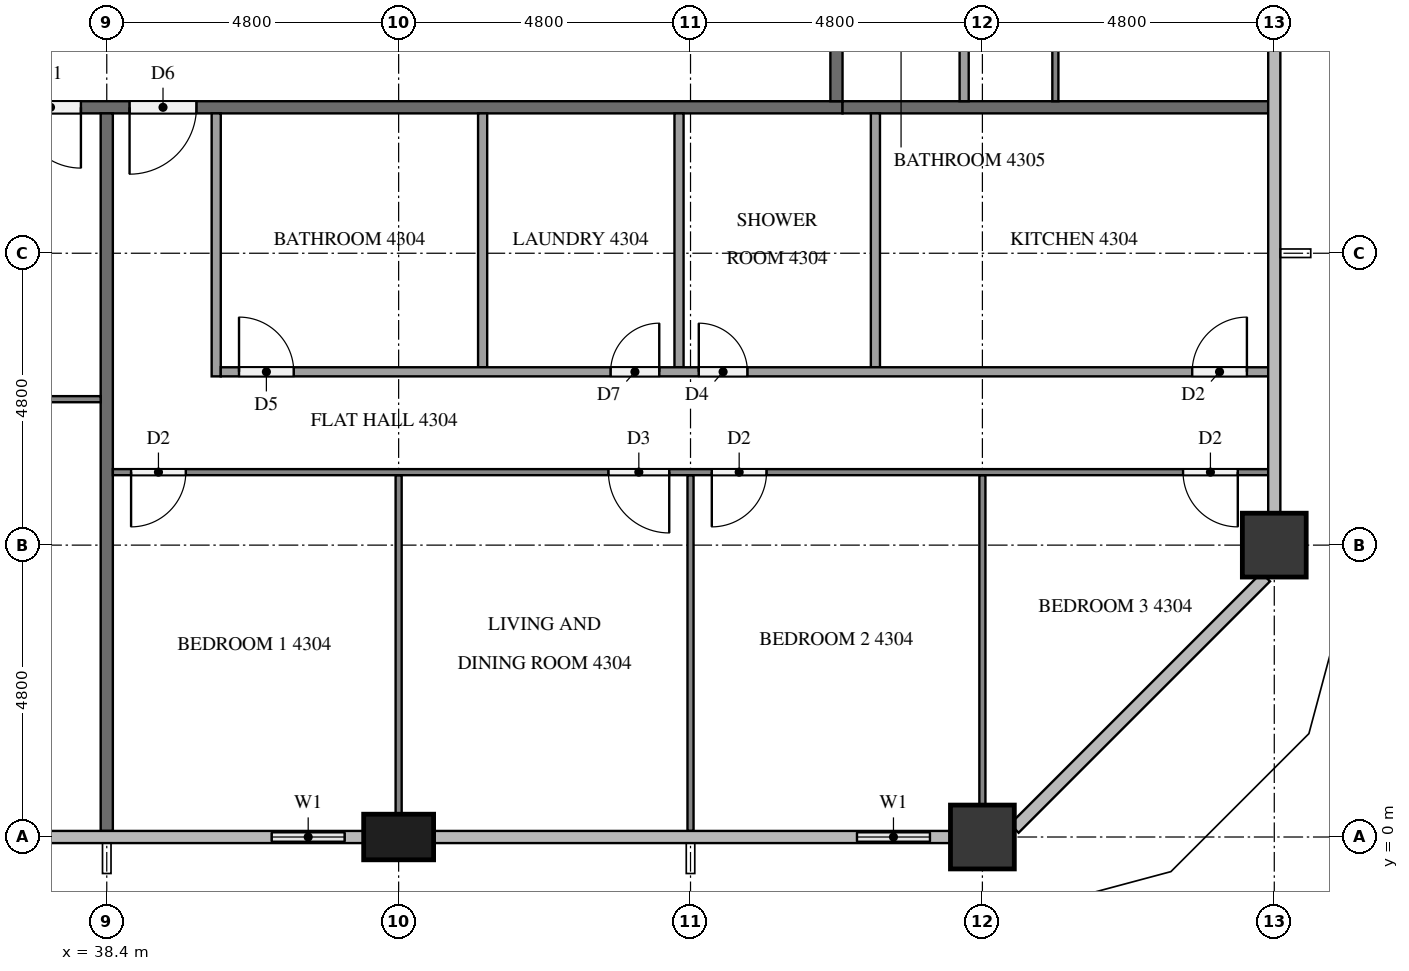
"""IFC4 building model, lengths in metres.
Left out: names, types, materials, properties, quantities, classifications, styles, units other than length and angle.
Written with IfcOpenShell. Run it as: python <this file> out.ifc"""

import sys

from ifc_helpers import new_model, si_unit, direction, frame, frame_2d, origin, origin_2d, place, context, subcontext, project, spatial, rectangle, extrude, element, fill, save


model = new_model("IFC4")
c1 = context("Model", 3, precision=1e-05, world=origin(), true_north=direction((0.0, 1.0)))
c2 = subcontext(c1, "Body", "Model", "MODEL_VIEW")
j1 = project(units=[si_unit("LENGTHUNIT", "METRE"), si_unit("PLANEANGLEUNIT", "RADIAN")], contexts=[c1])
p1 = place(None, origin())
s1 = spatial("IfcSite", under=j1, at=p1, CompositionType="ELEMENT")
p2 = place(p1, origin())
s2 = spatial("IfcBuilding", under=s1, at=p2, CompositionType="ELEMENT")
p3 = place(p2, frame((0.0, 0.0, 166.5)))
s3 = spatial("IfcBuildingStorey", under=s2, at=p3, CompositionType="ELEMENT", Elevation=166.5)
p4 = place(p3, frame((43.2, 0.0, 0.0), z_axis=(0.0, 0.0, 1.0), x_axis=(1.0, 0.0, 0.0)))
e1 = element("IfcColumn", 1, at=p4, inside=s3, PredefinedType="COLUMN", context=c2, shape_type="SweptSolid", body=[
    extrude(rectangle(XDim=1.15, YDim=0.75, at=origin_2d()), origin(), (0.0, 0.0, 1.0), 3.2),
])
for number, where, z_axis, x_axis in (
    (2, (52.8, 0.0, 0.0), (0.0, 0.0, 1.0), (1.0, 0.0, 0.0)),
    (3, (57.6, 4.8, 0.0), (0.0, 0.0, 1.0), (1.0, 0.0, 0.0)),
):
    element("IfcColumn", number, at=place(p3, frame(where, z_axis=z_axis, x_axis=x_axis)), inside=s3, PredefinedType="COLUMN", context=c2, shape_type="SweptSolid", body=[
        extrude(rectangle(XDim=1.05, YDim=1.05, at=origin_2d()), origin(), (0.0, 0.0, 1.0), 3.2),
    ])
p5 = place(p3, frame((40.8, 0.0, 0.0), z_axis=(0.0, 0.0, 1.0), x_axis=(1.0, 0.0, 0.0)))
e4 = element("IfcWall", 4, at=p5, inside=s3, PredefinedType="SOLIDWALL", context=c2, shape_type="SweptSolid", body=[
    extrude(rectangle(XDim=1.825, YDim=0.15, at=frame_2d((0.913, 0.0))), origin(), (0.0, 0.0, 1.0), 3.2),
])
p6 = place(p5, frame((0.312, 0.0, 0.9)))
e5 = element("IfcOpeningElement", 5, at=p6, cuts=e4, PredefinedType="OPENING", context=c2, shape_type="SweptSolid", body=[
    extrude(rectangle(XDim=1.2, YDim=1.4, at=frame_2d((0.6, 0.7))), frame((0.0, 0.085, 0.0), z_axis=(0.0, -1.0, 0.0), x_axis=(1.0, 0.0, 0.0)), (0.0, 0.0, 1.0), 0.17),
])
p7 = place(p3, frame((50.4, 0.0, 0.0), z_axis=(0.0, 0.0, 1.0), x_axis=(1.0, 0.0, 0.0)))
e6 = element("IfcWall", 6, at=p7, inside=s3, PredefinedType="SOLIDWALL", context=c2, shape_type="SweptSolid", body=[
    extrude(rectangle(XDim=1.875, YDim=0.15, at=frame_2d((0.938, 0.0))), origin(), (0.0, 0.0, 1.0), 3.2),
])
p8 = place(p7, frame((0.337, 0.0, 0.9)))
e7 = element("IfcOpeningElement", 7, at=p8, cuts=e6, PredefinedType="OPENING", context=c2, shape_type="SweptSolid", body=[
    extrude(rectangle(XDim=1.2, YDim=1.4, at=frame_2d((0.6, 0.7))), frame((0.0, 0.085, 0.0), z_axis=(0.0, -1.0, 0.0), x_axis=(1.0, 0.0, 0.0)), (0.0, 0.0, 1.0), 0.17),
])
p9 = place(p3, frame((50.5, 12.0, 0.0), z_axis=(0.0, 0.0, 1.0), x_axis=(-1.0, 0.0, 0.0)))
e8 = element("IfcWall", 8, at=p9, inside=s3, PredefinedType="PARTITIONING", context=c2, shape_type="SweptSolid", body=[
    extrude(rectangle(XDim=38.6, YDim=0.2, at=frame_2d((19.3, 0.0))), origin(), (0.0, 0.0, 1.0), 3.2),
])
p10 = place(p9, frame((34.125, 0.0, 0.0)))
e9 = element("IfcOpeningElement", 9, at=p10, cuts=e8, PredefinedType="OPENING", context=c2, shape_type="SweptSolid", body=[
    extrude(rectangle(XDim=1.0, YDim=2.1, at=frame_2d((0.5, 1.05))), frame((0.0, 0.11, 0.0), z_axis=(0.0, -1.0, 0.0), x_axis=(1.0, 0.0, 0.0)), (0.0, 0.0, 1.0), 0.22),
])
p11 = place(p9, frame((32.275, 0.0, 0.0)))
e10 = element("IfcOpeningElement", 10, at=p11, cuts=e8, PredefinedType="OPENING", context=c2, shape_type="SweptSolid", body=[
    extrude(rectangle(XDim=1.0, YDim=2.1, at=frame_2d((0.5, 1.05))), frame((0.0, 0.11, 0.0), z_axis=(0.0, -1.0, 0.0), x_axis=(1.0, 0.0, 0.0)), (0.0, 0.0, 1.0), 0.22),
])
p12 = place(p9, frame((12.525, 0.0, 0.0)))
e11 = element("IfcOpeningElement", 11, at=p12, cuts=e8, PredefinedType="OPENING", context=c2, shape_type="SweptSolid", body=[
    extrude(rectangle(XDim=1.0, YDim=2.1, at=frame_2d((0.5, 1.05))), frame((0.0, 0.11, 0.0), z_axis=(0.0, -1.0, 0.0), x_axis=(1.0, 0.0, 0.0)), (0.0, 0.0, 1.0), 0.22),
])
p13 = place(p9, frame((10.625, 0.0, 0.0)))
e12 = element("IfcOpeningElement", 12, at=p13, cuts=e8, PredefinedType="OPENING", context=c2, shape_type="SweptSolid", body=[
    extrude(rectangle(XDim=1.1, YDim=2.1, at=frame_2d((0.55, 1.05))), frame((0.0, 0.11, 0.0), z_axis=(0.0, -1.0, 0.0), x_axis=(1.0, 0.0, 0.0)), (0.0, 0.0, 1.0), 0.22),
])
p14 = place(p3, frame((50.4, 40.7, 0.0), z_axis=(0.0, 0.0, 1.0), x_axis=(0.0, -1.0, 0.0)))
e13 = element("IfcWall", 13, at=p14, inside=s3, PredefinedType="PARTITIONING", context=c2, shape_type="SweptSolid", body=[
    extrude(rectangle(XDim=28.6, YDim=0.2, at=frame_2d((14.3, 0.0))), origin(), (0.0, 0.0, 1.0), 3.2),
])
p15 = place(p14, frame((19.525, 0.0, 0.0)))
e14 = element("IfcOpeningElement", 14, at=p15, cuts=e13, PredefinedType="OPENING", context=c2, shape_type="SweptSolid", body=[
    extrude(rectangle(XDim=1.0, YDim=2.1, at=frame_2d((0.5, 1.05))), frame((0.0, 0.11, 0.0), z_axis=(0.0, -1.0, 0.0), x_axis=(1.0, 0.0, 0.0)), (0.0, 0.0, 1.0), 0.22),
])
p16 = place(p14, frame((17.675, 0.0, 0.0)))
e15 = element("IfcOpeningElement", 15, at=p16, cuts=e13, PredefinedType="OPENING", context=c2, shape_type="SweptSolid", body=[
    extrude(rectangle(XDim=1.0, YDim=2.1, at=frame_2d((0.5, 1.05))), frame((0.0, 0.11, 0.0), z_axis=(0.0, -1.0, 0.0), x_axis=(1.0, 0.0, 0.0)), (0.0, 0.0, 1.0), 0.22),
])
p17 = place(p14, frame((8.075, 0.0, 0.0)))
e16 = element("IfcOpeningElement", 16, at=p17, cuts=e13, PredefinedType="OPENING", context=c2, shape_type="SweptSolid", body=[
    extrude(rectangle(XDim=1.0, YDim=2.1, at=frame_2d((0.5, 1.05))), frame((0.0, 0.11, 0.0), z_axis=(0.0, -1.0, 0.0), x_axis=(1.0, 0.0, 0.0)), (0.0, 0.0, 1.0), 0.22),
])
p18 = place(p3, frame((38.4, 11.9, 0.0), z_axis=(0.0, 0.0, 1.0), x_axis=(0.0, -1.0, 0.0)))
e17 = element("IfcWall", 17, at=p18, inside=s3, PredefinedType="PARTITIONING", context=c2, shape_type="SweptSolid", body=[
    extrude(rectangle(XDim=11.8, YDim=0.2, at=frame_2d((5.9, 0.0))), origin(), (0.0, 0.0, 1.0), 3.2),
])
p19 = place(p3, frame((50.5, 12.0, 0.0), z_axis=(0.0, 0.0, 1.0), x_axis=(1.0, 0.0, 0.0)))
e18 = element("IfcWall", 18, at=p19, inside=s3, PredefinedType="PARTITIONING", context=c2, shape_type="SweptSolid", body=[
    extrude(rectangle(XDim=7.0, YDim=0.2, at=frame_2d((3.5, 0.0))), origin(), (0.0, 0.0, 1.0), 3.2),
])
p20 = place(p3, frame((38.3, 7.2, 0.0), z_axis=(0.0, 0.0, 1.0), x_axis=(-1.0, 0.0, 0.0)))
e19 = element("IfcWall", 19, at=p20, inside=s3, PredefinedType="PARTITIONING", context=c2, shape_type="SweptSolid", body=[
    extrude(rectangle(XDim=14.2, YDim=0.1, at=frame_2d((7.1, 0.0))), origin(), (0.0, 0.0, 1.0), 3.2),
])
p21 = place(p20, frame((3.45, 0.0, 0.0)))
e20 = element("IfcOpeningElement", 20, at=p21, cuts=e19, PredefinedType="OPENING", context=c2, shape_type="SweptSolid", body=[
    extrude(rectangle(XDim=0.9, YDim=2.1, at=frame_2d((0.45, 1.05))), frame((0.0, 0.06, 0.0), z_axis=(0.0, -1.0, 0.0), x_axis=(1.0, 0.0, 0.0)), (0.0, 0.0, 1.0), 0.12),
])
p22 = place(p20, frame((5.05, 0.0, 0.0)))
e21 = element("IfcOpeningElement", 21, at=p22, cuts=e19, PredefinedType="OPENING", context=c2, shape_type="SweptSolid", body=[
    extrude(rectangle(XDim=0.9, YDim=2.1, at=frame_2d((0.45, 1.05))), frame((0.0, 0.06, 0.0), z_axis=(0.0, -1.0, 0.0), x_axis=(1.0, 0.0, 0.0)), (0.0, 0.0, 1.0), 0.12),
])
p23 = place(p20, frame((12.9, 0.0, 0.0)))
e22 = element("IfcOpeningElement", 22, at=p23, cuts=e19, PredefinedType="OPENING", context=c2, shape_type="SweptSolid", body=[
    extrude(rectangle(XDim=1.0, YDim=2.1, at=frame_2d((0.5, 1.05))), frame((0.0, 0.06, 0.0), z_axis=(0.0, -1.0, 0.0), x_axis=(1.0, 0.0, 0.0)), (0.0, 0.0, 1.0), 0.12),
])
p24 = place(p3, frame((43.2, 5.95, 0.0), z_axis=(0.0, 0.0, 1.0), x_axis=(0.0, -1.0, 0.0)))
e23 = element("IfcWall", 23, at=p24, inside=s3, PredefinedType="PARTITIONING", context=c2, shape_type="SweptSolid", body=[
    extrude(rectangle(XDim=5.575, YDim=0.1, at=frame_2d((2.788, 0.0))), origin(), (0.0, 0.0, 1.0), 3.2),
])
p25 = place(p3, frame((48.0, 5.95, 0.0), z_axis=(0.0, 0.0, 1.0), x_axis=(0.0, -1.0, 0.0)))
e24 = element("IfcWall", 24, at=p25, inside=s3, PredefinedType="PARTITIONING", context=c2, shape_type="SweptSolid", body=[
    extrude(rectangle(XDim=5.85, YDim=0.1, at=frame_2d((2.925, 0.0))), origin(), (0.0, 0.0, 1.0), 3.2),
])
p26 = place(p3, frame((52.8, 5.95, 0.0), z_axis=(0.0, 0.0, 1.0), x_axis=(0.0, -1.0, 0.0)))
e25 = element("IfcWall", 25, at=p26, inside=s3, PredefinedType="PARTITIONING", context=c2, shape_type="SweptSolid", body=[
    extrude(rectangle(XDim=5.425, YDim=0.1, at=frame_2d((2.712, 0.0))), origin(), (0.0, 0.0, 1.0), 3.2),
])
p27 = place(p3, frame((57.5, 6.0, 0.0), z_axis=(0.0, 0.0, 1.0), x_axis=(-1.0, 0.0, 0.0)))
e26 = element("IfcWall", 26, at=p27, inside=s3, PredefinedType="PARTITIONING", context=c2, shape_type="SweptSolid", body=[
    extrude(rectangle(XDim=19.0, YDim=0.1, at=frame_2d((9.5, 0.0))), origin(), (0.0, 0.0, 1.0), 3.2),
])
p28 = place(p27, frame((17.8, 0.0, 0.0)))
e27 = element("IfcOpeningElement", 27, at=p28, cuts=e26, PredefinedType="OPENING", context=c2, shape_type="SweptSolid", body=[
    extrude(rectangle(XDim=0.9, YDim=2.1, at=frame_2d((0.45, 1.05))), frame((0.0, 0.06, 0.0), z_axis=(0.0, -1.0, 0.0), x_axis=(1.0, 0.0, 0.0)), (0.0, 0.0, 1.0), 0.12),
])
p29 = place(p27, frame((9.85, 0.0, 0.0)))
e28 = element("IfcOpeningElement", 28, at=p29, cuts=e26, PredefinedType="OPENING", context=c2, shape_type="SweptSolid", body=[
    extrude(rectangle(XDim=1.0, YDim=2.1, at=frame_2d((0.5, 1.05))), frame((0.0, 0.06, 0.0), z_axis=(0.0, -1.0, 0.0), x_axis=(1.0, 0.0, 0.0)), (0.0, 0.0, 1.0), 0.12),
])
p30 = place(p27, frame((8.25, 0.0, 0.0)))
e29 = element("IfcOpeningElement", 29, at=p30, cuts=e26, PredefinedType="OPENING", context=c2, shape_type="SweptSolid", body=[
    extrude(rectangle(XDim=0.9, YDim=2.1, at=frame_2d((0.45, 1.05))), frame((0.0, 0.06, 0.0), z_axis=(0.0, -1.0, 0.0), x_axis=(1.0, 0.0, 0.0)), (0.0, 0.0, 1.0), 0.12),
])
p31 = place(p27, frame((0.5, 0.0, 0.0)))
e30 = element("IfcOpeningElement", 30, at=p31, cuts=e26, PredefinedType="OPENING", context=c2, shape_type="SweptSolid", body=[
    extrude(rectangle(XDim=0.9, YDim=2.1, at=frame_2d((0.45, 1.05))), frame((0.0, 0.06, 0.0), z_axis=(0.0, -1.0, 0.0), x_axis=(1.0, 0.0, 0.0)), (0.0, 0.0, 1.0), 0.12),
])
for number, where, z_axis, x_axis in (
    (31, (44.581, 11.9, 0.0), (0.0, 0.0, 1.0), (0.0, -1.0, 0.0)),
    (32, (47.811, 11.9, 0.0), (0.0, 0.0, 1.0), (0.0, -1.0, 0.0)),
    (33, (51.041, 11.9, 0.0), (0.0, 0.0, 1.0), (0.0, -1.0, 0.0)),
):
    element("IfcWall", number, at=place(p3, frame(where, z_axis=z_axis, x_axis=x_axis)), inside=s3, PredefinedType="PARTITIONING", context=c2, shape_type="SweptSolid", body=[
        extrude(rectangle(XDim=4.175, YDim=0.15, at=frame_2d((2.087, 0.0))), origin(), (0.0, 0.0, 1.0), 3.2),
    ])
p32 = place(p3, frame((40.2, 11.9, 0.0), z_axis=(0.0, 0.0, 1.0), x_axis=(0.0, -1.0, 0.0)))
e34 = element("IfcWall", 34, at=p32, inside=s3, PredefinedType="PARTITIONING", context=c2, shape_type="SweptSolid", body=[
    extrude(rectangle(XDim=4.325, YDim=0.15, at=frame_2d((2.163, 0.0))), origin(), (0.0, 0.0, 1.0), 3.2),
])
p33 = place(p3, frame((40.275, 7.65, 0.0), z_axis=(0.0, 0.0, 1.0), x_axis=(1.0, 0.0, 0.0)))
e35 = element("IfcWall", 35, at=p33, inside=s3, PredefinedType="PARTITIONING", context=c2, shape_type="SweptSolid", body=[
    extrude(rectangle(XDim=17.225, YDim=0.15, at=frame_2d((8.613, 0.0))), origin(), (0.0, 0.0, 1.0), 3.2),
])
p34 = place(p33, frame((0.3, 0.0, 0.0)))
e36 = element("IfcOpeningElement", 36, at=p34, cuts=e35, PredefinedType="OPENING", context=c2, shape_type="SweptSolid", body=[
    extrude(rectangle(XDim=0.9, YDim=2.1, at=frame_2d((0.45, 1.05))), frame((0.0, 0.085, 0.0), z_axis=(0.0, -1.0, 0.0), x_axis=(1.0, 0.0, 0.0)), (0.0, 0.0, 1.0), 0.17),
])
p35 = place(p33, frame((6.411, 0.0, 0.0)))
e37 = element("IfcOpeningElement", 37, at=p35, cuts=e35, PredefinedType="OPENING", context=c2, shape_type="SweptSolid", body=[
    extrude(rectangle(XDim=0.8, YDim=2.1, at=frame_2d((0.4, 1.05))), frame((0.0, 0.085, 0.0), z_axis=(0.0, -1.0, 0.0), x_axis=(1.0, 0.0, 0.0)), (0.0, 0.0, 1.0), 0.17),
])
p36 = place(p33, frame((7.861, 0.0, 0.0)))
e38 = element("IfcOpeningElement", 38, at=p36, cuts=e35, PredefinedType="OPENING", context=c2, shape_type="SweptSolid", body=[
    extrude(rectangle(XDim=0.8, YDim=2.1, at=frame_2d((0.4, 1.05))), frame((0.0, 0.085, 0.0), z_axis=(0.0, -1.0, 0.0), x_axis=(1.0, 0.0, 0.0)), (0.0, 0.0, 1.0), 0.17),
])
p37 = place(p33, frame((15.975, 0.0, 0.0)))
e39 = element("IfcOpeningElement", 39, at=p37, cuts=e35, PredefinedType="OPENING", context=c2, shape_type="SweptSolid", body=[
    extrude(rectangle(XDim=0.9, YDim=2.1, at=frame_2d((0.45, 1.05))), frame((0.0, 0.085, 0.0), z_axis=(0.0, -1.0, 0.0), x_axis=(1.0, 0.0, 0.0)), (0.0, 0.0, 1.0), 0.17),
])
p38 = place(p3, frame((54.0, 21.5, 0.0), z_axis=(0.0, 0.0, 1.0), x_axis=(0.0, -1.0, 0.0)))
e40 = element("IfcWall", 40, at=p38, inside=s3, PredefinedType="PARTITIONING", context=c2, shape_type="SweptSolid", body=[
    extrude(rectangle(XDim=9.4, YDim=0.1, at=frame_2d((4.7, 0.0))), origin(), (0.0, 0.0, 1.0), 3.2),
])
p39 = place(p38, frame((3.35, 0.0, 0.0)))
e41 = element("IfcOpeningElement", 41, at=p39, cuts=e40, PredefinedType="OPENING", context=c2, shape_type="SweptSolid", body=[
    extrude(rectangle(XDim=1.0, YDim=2.1, at=frame_2d((0.5, 1.05))), frame((0.0, 0.06, 0.0), z_axis=(0.0, -1.0, 0.0), x_axis=(1.0, 0.0, 0.0)), (0.0, 0.0, 1.0), 0.12),
])
p40 = place(p38, frame((5.05, 0.0, 0.0)))
e42 = element("IfcOpeningElement", 42, at=p40, cuts=e40, PredefinedType="OPENING", context=c2, shape_type="SweptSolid", body=[
    extrude(rectangle(XDim=0.9, YDim=2.1, at=frame_2d((0.45, 1.05))), frame((0.0, 0.06, 0.0), z_axis=(0.0, -1.0, 0.0), x_axis=(1.0, 0.0, 0.0)), (0.0, 0.0, 1.0), 0.12),
])
p41 = place(p3, frame((52.5, 12.1, 0.0), z_axis=(0.0, 0.0, 1.0), x_axis=(0.0, 1.0, 0.0)))
e43 = element("IfcWall", 43, at=p41, inside=s3, PredefinedType="PARTITIONING", context=c2, shape_type="SweptSolid", body=[
    extrude(rectangle(XDim=7.625, YDim=0.15, at=frame_2d((3.812, 0.0))), origin(), (0.0, 0.0, 1.0), 3.2),
])
p42 = place(p41, frame((3.375, 0.0, 0.0)))
e44 = element("IfcOpeningElement", 44, at=p42, cuts=e43, PredefinedType="OPENING", context=c2, shape_type="SweptSolid", body=[
    extrude(rectangle(XDim=0.9, YDim=2.1, at=frame_2d((0.45, 1.05))), frame((0.0, 0.085, 0.0), z_axis=(0.0, -1.0, 0.0), x_axis=(1.0, 0.0, 0.0)), (0.0, 0.0, 1.0), 0.17),
])
p43 = place(p41, frame((1.925, 0.0, 0.0)))
e45 = element("IfcOpeningElement", 45, at=p43, cuts=e43, PredefinedType="OPENING", context=c2, shape_type="SweptSolid", body=[
    extrude(rectangle(XDim=0.8, YDim=2.1, at=frame_2d((0.4, 1.05))), frame((0.0, 0.085, 0.0), z_axis=(0.0, -1.0, 0.0), x_axis=(1.0, 0.0, 0.0)), (0.0, 0.0, 1.0), 0.17),
])
p44 = place(p6, origin())
e46 = element("IfcWindow", 46, at=p44, inside=s3, PartitioningType="SINGLE_PANEL", PredefinedType="WINDOW", context=c2, shape_type="SweptSolid", body=[
    extrude(rectangle(XDim=1.2, YDim=1.4, at=frame_2d((0.6, 0.7))), frame((0.0, 0.03, 0.0), z_axis=(0.0, -1.0, 0.0), x_axis=(1.0, 0.0, 0.0)), (0.0, 0.0, 1.0), 0.06),
])
fill(e5, e46)
p45 = place(p8, origin())
e47 = element("IfcWindow", 47, at=p45, inside=s3, PartitioningType="SINGLE_PANEL", PredefinedType="WINDOW", context=c2, shape_type="SweptSolid", body=[
    extrude(rectangle(XDim=1.2, YDim=1.4, at=frame_2d((0.6, 0.7))), frame((0.0, 0.03, 0.0), z_axis=(0.0, -1.0, 0.0), x_axis=(1.0, 0.0, 0.0)), (0.0, 0.0, 1.0), 0.06),
])
fill(e7, e47)
p46 = place(p12, origin())
e48 = element("IfcDoor", 48, at=p46, inside=s3, OperationType="SINGLE_SWING_LEFT", PredefinedType="DOOR", context=c2, shape_type="SweptSolid", body=[
    extrude(rectangle(XDim=1.0, YDim=2.1, at=frame_2d((0.5, 1.05))), frame((0.0, 0.025, 0.0), z_axis=(0.0, -1.0, 0.0), x_axis=(1.0, 0.0, 0.0)), (0.0, 0.0, 1.0), 0.05),
])
fill(e11, e48)
p47 = place(p13, origin())
e49 = element("IfcDoor", 49, at=p47, inside=s3, OperationType="SINGLE_SWING_RIGHT", PredefinedType="DOOR", context=c2, shape_type="SweptSolid", body=[
    extrude(rectangle(XDim=1.1, YDim=2.1, at=frame_2d((0.55, 1.05))), frame((0.0, 0.025, 0.0), z_axis=(0.0, -1.0, 0.0), x_axis=(1.0, 0.0, 0.0)), (0.0, 0.0, 1.0), 0.05),
])
fill(e12, e49)
p48 = place(p28, origin())
e50 = element("IfcDoor", 50, at=p48, inside=s3, OperationType="SINGLE_SWING_RIGHT", PredefinedType="DOOR", context=c2, shape_type="SweptSolid", body=[
    extrude(rectangle(XDim=0.9, YDim=2.1, at=frame_2d((0.45, 1.05))), frame((0.0, 0.025, 0.0), z_axis=(0.0, -1.0, 0.0), x_axis=(1.0, 0.0, 0.0)), (0.0, 0.0, 1.0), 0.05),
])
fill(e27, e50)
p49 = place(p29, origin())
e51 = element("IfcDoor", 51, at=p49, inside=s3, OperationType="SINGLE_SWING_LEFT", PredefinedType="DOOR", context=c2, shape_type="SweptSolid", body=[
    extrude(rectangle(XDim=1.0, YDim=2.1, at=frame_2d((0.5, 1.05))), frame((0.0, 0.025, 0.0), z_axis=(0.0, -1.0, 0.0), x_axis=(1.0, 0.0, 0.0)), (0.0, 0.0, 1.0), 0.05),
])
fill(e28, e51)
p50 = place(p30, origin())
e52 = element("IfcDoor", 52, at=p50, inside=s3, OperationType="SINGLE_SWING_RIGHT", PredefinedType="DOOR", context=c2, shape_type="SweptSolid", body=[
    extrude(rectangle(XDim=0.9, YDim=2.1, at=frame_2d((0.45, 1.05))), frame((0.0, 0.025, 0.0), z_axis=(0.0, -1.0, 0.0), x_axis=(1.0, 0.0, 0.0)), (0.0, 0.0, 1.0), 0.05),
])
fill(e29, e52)
p51 = place(p31, origin())
e53 = element("IfcDoor", 53, at=p51, inside=s3, OperationType="SINGLE_SWING_LEFT", PredefinedType="DOOR", context=c2, shape_type="SweptSolid", body=[
    extrude(rectangle(XDim=0.9, YDim=2.1, at=frame_2d((0.45, 1.05))), frame((0.0, 0.025, 0.0), z_axis=(0.0, -1.0, 0.0), x_axis=(1.0, 0.0, 0.0)), (0.0, 0.0, 1.0), 0.05),
])
fill(e30, e53)
p52 = place(p34, origin())
e54 = element("IfcDoor", 54, at=p52, inside=s3, OperationType="SINGLE_SWING_LEFT", PredefinedType="DOOR", context=c2, shape_type="SweptSolid", body=[
    extrude(rectangle(XDim=0.9, YDim=2.1, at=frame_2d((0.45, 1.05))), frame((0.0, 0.025, 0.0), z_axis=(0.0, -1.0, 0.0), x_axis=(1.0, 0.0, 0.0)), (0.0, 0.0, 1.0), 0.05),
])
fill(e36, e54)
p53 = place(p35, origin())
e55 = element("IfcDoor", 55, at=p53, inside=s3, OperationType="SINGLE_SWING_RIGHT", PredefinedType="DOOR", context=c2, shape_type="SweptSolid", body=[
    extrude(rectangle(XDim=0.8, YDim=2.1, at=frame_2d((0.4, 1.05))), frame((0.0, 0.025, 0.0), z_axis=(0.0, -1.0, 0.0), x_axis=(1.0, 0.0, 0.0)), (0.0, 0.0, 1.0), 0.05),
])
fill(e37, e55)
p54 = place(p36, origin())
e56 = element("IfcDoor", 56, at=p54, inside=s3, OperationType="SINGLE_SWING_LEFT", PredefinedType="DOOR", context=c2, shape_type="SweptSolid", body=[
    extrude(rectangle(XDim=0.8, YDim=2.1, at=frame_2d((0.4, 1.05))), frame((0.0, 0.025, 0.0), z_axis=(0.0, -1.0, 0.0), x_axis=(1.0, 0.0, 0.0)), (0.0, 0.0, 1.0), 0.05),
])
fill(e38, e56)
p55 = place(p37, origin())
e57 = element("IfcDoor", 57, at=p55, inside=s3, OperationType="SINGLE_SWING_RIGHT", PredefinedType="DOOR", context=c2, shape_type="SweptSolid", body=[
    extrude(rectangle(XDim=0.9, YDim=2.1, at=frame_2d((0.45, 1.05))), frame((0.0, 0.025, 0.0), z_axis=(0.0, -1.0, 0.0), x_axis=(1.0, 0.0, 0.0)), (0.0, 0.0, 1.0), 0.05),
])
fill(e39, e57)
save(model, sys.argv[1])
